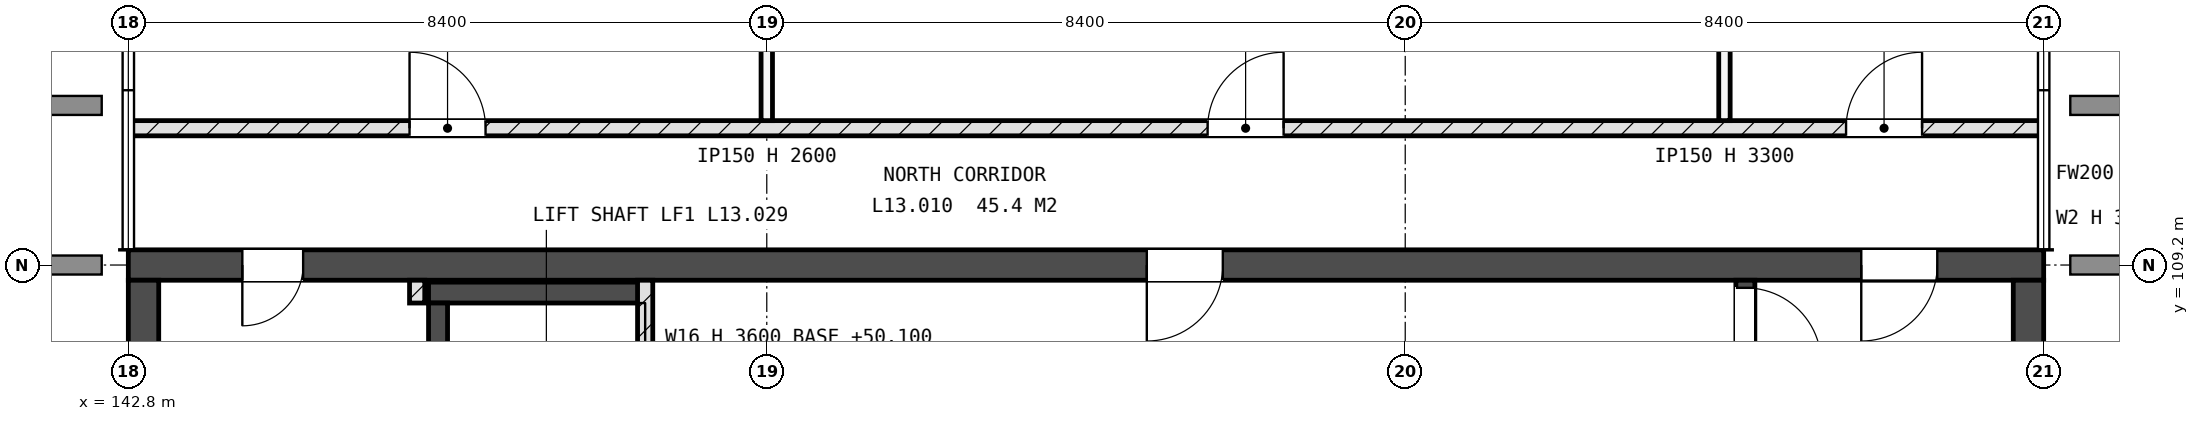
"""IFC4 building model, lengths in metres.
Left out: names, types, materials, properties, quantities, classifications, styles, units other than length and angle.
Written with IfcOpenShell. Run it as: python <this file> out.ifc"""

import sys

from ifc_helpers import new_model, si_unit, direction, frame, frame_2d, origin, place, context, subcontext, project, spatial, rectangle, extrude, element, fill, save


model = new_model("IFC4")
c1 = context("Model", 3, precision=1e-05, world=origin(), true_north=direction((0.0, 1.0)))
c2 = subcontext(c1, "Body", "Model", "MODEL_VIEW")
j1 = project(units=[si_unit("LENGTHUNIT", "METRE"), si_unit("PLANEANGLEUNIT", "RADIAN")], contexts=[c1])
p1 = place(None, origin())
s1 = spatial("IfcSite", under=j1, at=p1, CompositionType="ELEMENT")
p2 = place(p1, origin())
s2 = spatial("IfcBuilding", under=s1, at=p2, CompositionType="ELEMENT")
p3 = place(p2, frame((0.0, 0.0, 50.4)))
s3 = spatial("IfcBuildingStorey", under=s2, at=p3, CompositionType="ELEMENT", Elevation=50.4)
p4 = place(p3, frame((142.8, 109.2, -0.3), z_axis=(0.0, 0.0, 1.0), x_axis=(1.0, 0.0, 0.0)))
e1 = element("IfcWall", 1, at=p4, inside=s3, PredefinedType="SHEAR", context=c2, shape_type="SweptSolid", body=[
    extrude(rectangle(XDim=25.2, YDim=0.4, at=frame_2d((12.6, 0.0))), origin(), (0.0, 0.0, 1.0), 3.6),
])
p5 = place(p4, frame((22.8, 0.0, 0.3)))
e2 = element("IfcOpeningElement", 2, at=p5, cuts=e1, PredefinedType="OPENING", context=c2, shape_type="SweptSolid", body=[
    extrude(rectangle(XDim=1.0, YDim=2.1, at=frame_2d((0.5, 1.05))), frame((0.0, 0.21, 0.0), z_axis=(0.0, -1.0, 0.0), x_axis=(1.0, 0.0, 0.0)), (0.0, 0.0, 1.0), 0.42),
])
p6 = place(p4, frame((1.5, 0.0, 0.3)))
e3 = element("IfcOpeningElement", 3, at=p6, cuts=e1, PredefinedType="OPENING", context=c2, shape_type="SweptSolid", body=[
    extrude(rectangle(XDim=0.8, YDim=2.1, at=frame_2d((0.4, 1.05))), frame((0.0, 0.21, 0.0), z_axis=(0.0, -1.0, 0.0), x_axis=(1.0, 0.0, 0.0)), (0.0, 0.0, 1.0), 0.42),
])
p7 = place(p4, frame((13.4, 0.0, 0.3)))
e4 = element("IfcOpeningElement", 4, at=p7, cuts=e1, PredefinedType="OPENING", context=c2, shape_type="SweptSolid", body=[
    extrude(rectangle(XDim=1.0, YDim=2.1, at=frame_2d((0.5, 1.05))), frame((0.0, 0.21, 0.0), z_axis=(0.0, -1.0, 0.0), x_axis=(1.0, 0.0, 0.0)), (0.0, 0.0, 1.0), 0.42),
])
p8 = place(p3, frame((143.0, 92.6, -0.3), z_axis=(0.0, 0.0, 1.0), x_axis=(0.0, 1.0, 0.0)))
e5 = element("IfcWall", 5, at=p8, inside=s3, PredefinedType="SHEAR", context=c2, shape_type="SweptSolid", body=[
    extrude(rectangle(XDim=16.4, YDim=0.4, at=frame_2d((8.2, 0.0))), origin(), (0.0, 0.0, 1.0), 3.6),
])
p9 = place(p8, frame((3.0, 0.0, 1.9)))
e6 = element("IfcOpeningElement", 6, at=p9, cuts=e5, PredefinedType="OPENING", context=c2, shape_type="SweptSolid", body=[
    extrude(rectangle(XDim=1.2, YDim=0.9, at=frame_2d((0.6, 0.45))), frame((0.0, 0.21, 0.0), z_axis=(0.0, -1.0, 0.0), x_axis=(1.0, 0.0, 0.0)), (0.0, 0.0, 1.0), 0.42),
])
p10 = place(p3, frame((167.8, 92.6, -0.3), z_axis=(0.0, 0.0, 1.0), x_axis=(0.0, 1.0, 0.0)))
e7 = element("IfcWall", 7, at=p10, inside=s3, PredefinedType="SHEAR", context=c2, shape_type="SweptSolid", body=[
    extrude(rectangle(XDim=16.4, YDim=0.4, at=frame_2d((8.2, 0.0))), origin(), (0.0, 0.0, 1.0), 3.6),
])
p11 = place(p10, frame((12.2, 0.0, 1.9)))
e8 = element("IfcOpeningElement", 8, at=p11, cuts=e7, PredefinedType="OPENING", context=c2, shape_type="SweptSolid", body=[
    extrude(rectangle(XDim=1.2, YDim=0.9, at=frame_2d((0.6, 0.45))), frame((0.0, 0.21, 0.0), z_axis=(0.0, -1.0, 0.0), x_axis=(1.0, 0.0, 0.0)), (0.0, 0.0, 1.0), 0.42),
])
p12 = place(p3, frame((164.075, 101.35, -0.3), z_axis=(0.0, 0.0, 1.0), x_axis=(0.0, 1.0, 0.0)))
e9 = element("IfcWall", 9, at=p12, inside=s3, PredefinedType="SHEAR", context=c2, shape_type="SweptSolid", body=[
    extrude(rectangle(XDim=7.65, YDim=0.25, at=frame_2d((3.825, 0.0))), origin(), (0.0, 0.0, 1.0), 3.6),
])
p13 = place(p12, frame((6.55, 0.0, 0.3)))
e10 = element("IfcOpeningElement", 10, at=p13, cuts=e9, PredefinedType="OPENING", context=c2, shape_type="SweptSolid", body=[
    extrude(rectangle(XDim=1.0, YDim=2.1, at=frame_2d((0.5, 1.05))), frame((0.0, 0.135, 0.0), z_axis=(0.0, -1.0, 0.0), x_axis=(1.0, 0.0, 0.0)), (0.0, 0.0, 1.0), 0.27),
])
p14 = place(p3, frame((146.75, 108.837, -0.3), z_axis=(0.0, 0.0, 1.0), x_axis=(1.0, 0.0, 0.0)))
e11 = element("IfcWall", 11, at=p14, inside=s3, PredefinedType="SHEAR", context=c2, shape_type="SweptSolid", body=[
    extrude(rectangle(XDim=2.85, YDim=0.275, at=frame_2d((1.425, 0.0))), origin(), (0.0, 0.0, 1.0), 3.6),
])
p15 = place(p3, frame((146.875, 105.8, -0.3), z_axis=(0.0, 0.0, 1.0), x_axis=(0.0, 1.0, 0.0)))
e12 = element("IfcWall", 12, at=p15, inside=s3, PredefinedType="SHEAR", context=c2, shape_type="SweptSolid", body=[
    extrude(rectangle(XDim=2.9, YDim=0.25, at=frame_2d((1.45, 0.0))), origin(), (0.0, 0.0, 1.0), 3.6),
])
p16 = place(p3, frame((142.8, 111.0, 0.0), z_axis=(0.0, 0.0, 1.0), x_axis=(1.0, 0.0, 0.0)))
e13 = element("IfcWall", 13, at=p16, inside=s3, PredefinedType="SOLIDWALL", context=c2, shape_type="SweptSolid", body=[
    extrude(rectangle(XDim=25.2, YDim=0.2, at=frame_2d((12.6, 0.0))), origin(), (0.0, 0.0, 1.0), 3.3),
])
p17 = place(p16, frame((3.7, 0.0, 0.0)))
e14 = element("IfcOpeningElement", 14, at=p17, cuts=e13, PredefinedType="OPENING", context=c2, shape_type="SweptSolid", body=[
    extrude(rectangle(XDim=1.0, YDim=2.1, at=frame_2d((0.5, 1.05))), frame((0.0, 0.11, 0.0), z_axis=(0.0, -1.0, 0.0), x_axis=(1.0, 0.0, 0.0)), (0.0, 0.0, 1.0), 0.22),
])
p18 = place(p16, frame((14.2, 0.0, 0.0)))
e15 = element("IfcOpeningElement", 15, at=p18, cuts=e13, PredefinedType="OPENING", context=c2, shape_type="SweptSolid", body=[
    extrude(rectangle(XDim=1.0, YDim=2.1, at=frame_2d((0.5, 1.05))), frame((0.0, 0.11, 0.0), z_axis=(0.0, -1.0, 0.0), x_axis=(1.0, 0.0, 0.0)), (0.0, 0.0, 1.0), 0.22),
])
p19 = place(p16, frame((22.6, 0.0, 0.0)))
e16 = element("IfcOpeningElement", 16, at=p19, cuts=e13, PredefinedType="OPENING", context=c2, shape_type="SweptSolid", body=[
    extrude(rectangle(XDim=1.0, YDim=2.1, at=frame_2d((0.5, 1.05))), frame((0.0, 0.11, 0.0), z_axis=(0.0, -1.0, 0.0), x_axis=(1.0, 0.0, 0.0)), (0.0, 0.0, 1.0), 0.22),
])
p20 = place(p3, frame((146.6, 108.7, 0.0), z_axis=(0.0, 0.0, 1.0), x_axis=(0.0, 1.0, 0.0)))
e17 = element("IfcWall", 17, at=p20, inside=s3, PredefinedType="SOLIDWALL", context=c2, shape_type="SweptSolid", body=[
    extrude(rectangle(XDim=0.3, YDim=0.2, at=frame_2d((0.15, 0.0))), origin(), (0.0, 0.0, 1.0), 3.3),
])
p21 = place(p3, frame((149.6, 105.3, 0.0), z_axis=(0.0, 0.0, 1.0), x_axis=(0.0, 1.0, 0.0)))
e18 = element("IfcWall", 18, at=p21, inside=s3, PredefinedType="SOLIDWALL", context=c2, shape_type="SweptSolid", body=[
    extrude(rectangle(XDim=3.7, YDim=0.2, at=frame_2d((1.85, 0.0))), origin(), (0.0, 0.0, 1.0), 3.3),
])
p22 = place(p21, frame((1.4, 0.0, 0.0)))
e19 = element("IfcOpeningElement", 19, at=p22, cuts=e18, PredefinedType="OPENING", context=c2, shape_type="SweptSolid", body=[
    extrude(rectangle(XDim=1.1, YDim=2.1, at=frame_2d((0.55, 1.05))), frame((0.0, 0.11, 0.0), z_axis=(0.0, -1.0, 0.0), x_axis=(1.0, 0.0, 0.0)), (0.0, 0.0, 1.0), 0.22),
])
p23 = place(p3, frame((151.2, 111.1, 0.0), z_axis=(0.0, 0.0, 1.0), x_axis=(0.0, 1.0, 0.0)))
e20 = element("IfcWall", 20, at=p23, inside=s3, PredefinedType="PARTITIONING", context=c2, shape_type="SweptSolid", body=[
    extrude(rectangle(XDim=6.5, YDim=0.15, at=frame_2d((3.25, 0.0))), origin(), (0.0, 0.0, 1.0), 2.6),
])
p24 = place(p3, frame((163.8, 111.1, 0.0), z_axis=(0.0, 0.0, 1.0), x_axis=(0.0, 1.0, 0.0)))
e21 = element("IfcWall", 21, at=p24, inside=s3, PredefinedType="PARTITIONING", context=c2, shape_type="SweptSolid", body=[
    extrude(rectangle(XDim=6.5, YDim=0.15, at=frame_2d((3.25, 0.0))), origin(), (0.0, 0.0, 1.0), 3.3),
])
p25 = place(p13, origin())
e22 = element("IfcDoor", 22, at=p25, inside=s3, OperationType="SINGLE_SWING_LEFT", PredefinedType="DOOR", context=c2, shape_type="SweptSolid", body=[
    extrude(rectangle(XDim=1.0, YDim=2.1, at=frame_2d((0.5, 1.05))), frame((0.0, 0.025, 0.0), z_axis=(0.0, -1.0, 0.0), x_axis=(1.0, 0.0, 0.0)), (0.0, 0.0, 1.0), 0.05),
])
fill(e10, e22)
p26 = place(p5, origin())
e23 = element("IfcDoor", 23, at=p26, inside=s3, OperationType="SINGLE_SWING_LEFT", PredefinedType="DOOR", context=c2, shape_type="SweptSolid", body=[
    extrude(rectangle(XDim=1.0, YDim=2.1, at=frame_2d((0.5, 1.05))), frame((0.0, 0.025, 0.0), z_axis=(0.0, -1.0, 0.0), x_axis=(1.0, 0.0, 0.0)), (0.0, 0.0, 1.0), 0.05),
])
fill(e2, e23)
p27 = place(p17, origin())
e24 = element("IfcDoor", 24, at=p27, inside=s3, OperationType="SINGLE_SWING_RIGHT", PredefinedType="DOOR", context=c2, shape_type="SweptSolid", body=[
    extrude(rectangle(XDim=1.0, YDim=2.1, at=frame_2d((0.5, 1.05))), frame((0.0, 0.025, 0.0), z_axis=(0.0, -1.0, 0.0), x_axis=(1.0, 0.0, 0.0)), (0.0, 0.0, 1.0), 0.05),
])
fill(e14, e24)
p28 = place(p18, origin())
e25 = element("IfcDoor", 25, at=p28, inside=s3, OperationType="SINGLE_SWING_LEFT", PredefinedType="DOOR", context=c2, shape_type="SweptSolid", body=[
    extrude(rectangle(XDim=1.0, YDim=2.1, at=frame_2d((0.5, 1.05))), frame((0.0, 0.025, 0.0), z_axis=(0.0, -1.0, 0.0), x_axis=(1.0, 0.0, 0.0)), (0.0, 0.0, 1.0), 0.05),
])
fill(e15, e25)
p29 = place(p19, origin())
e26 = element("IfcDoor", 26, at=p29, inside=s3, OperationType="SINGLE_SWING_LEFT", PredefinedType="DOOR", context=c2, shape_type="SweptSolid", body=[
    extrude(rectangle(XDim=1.0, YDim=2.1, at=frame_2d((0.5, 1.05))), frame((0.0, 0.025, 0.0), z_axis=(0.0, -1.0, 0.0), x_axis=(1.0, 0.0, 0.0)), (0.0, 0.0, 1.0), 0.05),
])
fill(e16, e26)
p30 = place(p6, origin())
e27 = element("IfcDoor", 27, at=p30, inside=s3, OperationType="SINGLE_SWING_LEFT", PredefinedType="DOOR", context=c2, shape_type="SweptSolid", body=[
    extrude(rectangle(XDim=0.8, YDim=2.1, at=frame_2d((0.4, 1.05))), frame((0.0, 0.025, 0.0), z_axis=(0.0, -1.0, 0.0), x_axis=(1.0, 0.0, 0.0)), (0.0, 0.0, 1.0), 0.05),
])
fill(e3, e27)
p31 = place(p7, origin())
e28 = element("IfcDoor", 28, at=p31, inside=s3, OperationType="SINGLE_SWING_LEFT", PredefinedType="DOOR", context=c2, shape_type="SweptSolid", body=[
    extrude(rectangle(XDim=1.0, YDim=2.1, at=frame_2d((0.5, 1.05))), frame((0.0, 0.025, 0.0), z_axis=(0.0, -1.0, 0.0), x_axis=(1.0, 0.0, 0.0)), (0.0, 0.0, 1.0), 0.05),
])
fill(e4, e28)
save(model, sys.argv[1])
